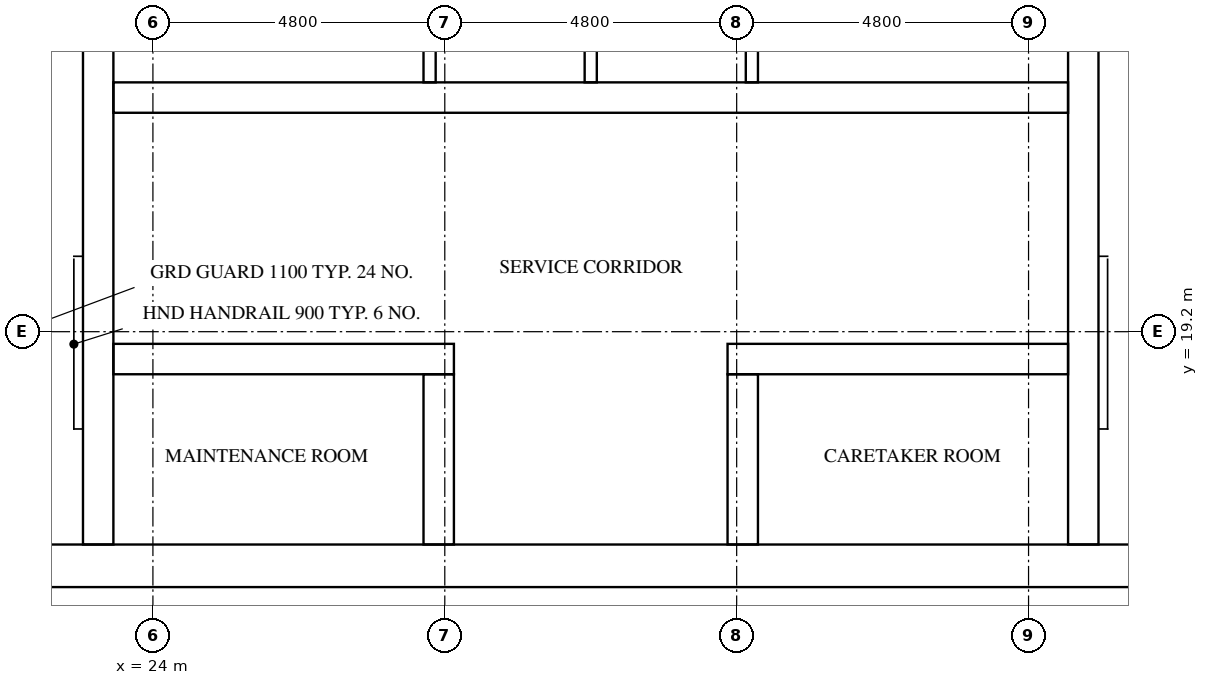
"""IFC4 building model, lengths in metres.
Left out: names, types, materials, properties, quantities, classifications, styles, units other than length and angle.
Written with IfcOpenShell. Run it as: python <this file> out.ifc"""

import sys

from ifc_helpers import new_model, si_unit, direction, frame, frame_2d, origin, place, context, subcontext, project, spatial, rectangle, extrude, element, fill, save


model = new_model("IFC4")
c1 = context("Model", 3, precision=1e-05, world=origin(), true_north=direction((0.0, 1.0)))
c2 = subcontext(c1, "Body", "Model", "MODEL_VIEW")
j1 = project(units=[si_unit("LENGTHUNIT", "METRE"), si_unit("PLANEANGLEUNIT", "RADIAN")], contexts=[c1])
p1 = place(None, origin())
s1 = spatial("IfcSite", under=j1, at=p1, CompositionType="ELEMENT")
p2 = place(p1, origin())
s2 = spatial("IfcBuilding", under=s1, at=p2, CompositionType="ELEMENT")
p3 = place(p2, frame((0.0, 0.0, 219.3)))
s3 = spatial("IfcBuildingStorey", under=s2, at=p3, CompositionType="ELEMENT", Elevation=219.3)
p4 = place(p3, frame((15.0, 15.35, 0.0), z_axis=(0.0, 0.0, 1.0), x_axis=(1.0, 0.0, 0.0)))
e1 = element("IfcWall", 1, at=p4, inside=s3, PredefinedType="SHEAR", context=c2, shape_type="SweptSolid", body=[
    extrude(rectangle(XDim=32.4, YDim=0.7, at=frame_2d((16.2, 0.0))), origin(), (0.0, 0.0, 1.0), 3.2),
])
p5 = place(p4, frame((15.3, 0.0, 0.0)))
e2 = element("IfcOpeningElement", 2, at=p5, cuts=e1, PredefinedType="OPENING", context=c2, shape_type="SweptSolid", body=[
    extrude(rectangle(XDim=1.8, YDim=2.1, at=frame_2d((0.9, 1.05))), frame((0.0, 0.36, 0.0), z_axis=(0.0, -1.0, 0.0), x_axis=(1.0, 0.0, 0.0)), (0.0, 0.0, 1.0), 0.72),
])
p6 = place(p3, frame((23.1, 15.7, 0.0), z_axis=(0.0, 0.0, 1.0), x_axis=(0.0, 1.0, 0.0)))
e3 = element("IfcWall", 3, at=p6, inside=s3, PredefinedType="SHEAR", context=c2, shape_type="SweptSolid", body=[
    extrude(rectangle(XDim=21.4, YDim=0.5, at=frame_2d((10.7, 0.0))), origin(), (0.0, 0.0, 1.0), 3.2),
])
p7 = place(p3, frame((39.3, 15.7, 0.0), z_axis=(0.0, 0.0, 1.0), x_axis=(0.0, 1.0, 0.0)))
e4 = element("IfcWall", 4, at=p7, inside=s3, PredefinedType="SHEAR", context=c2, shape_type="SweptSolid", body=[
    extrude(rectangle(XDim=8.55, YDim=0.5, at=frame_2d((4.275, 0.0))), origin(), (0.0, 0.0, 1.0), 3.2),
])
p8 = place(p3, frame((23.35, 18.75, 0.0), z_axis=(0.0, 0.0, 1.0), x_axis=(1.0, 0.0, 0.0)))
e5 = element("IfcWall", 5, at=p8, inside=s3, PredefinedType="SHEAR", context=c2, shape_type="SweptSolid", body=[
    extrude(rectangle(XDim=5.6, YDim=0.5, at=frame_2d((2.8, 0.0))), origin(), (0.0, 0.0, 1.0), 3.2),
])
p9 = place(p8, frame((2.05, 0.0, 0.0)))
e6 = element("IfcOpeningElement", 6, at=p9, cuts=e5, PredefinedType="OPENING", context=c2, shape_type="SweptSolid", body=[
    extrude(rectangle(XDim=1.0, YDim=2.1, at=frame_2d((0.5, 1.05))), frame((0.0, 0.26, 0.0), z_axis=(0.0, -1.0, 0.0), x_axis=(1.0, 0.0, 0.0)), (0.0, 0.0, 1.0), 0.52),
])
p10 = place(p3, frame((33.45, 18.75, 0.0), z_axis=(0.0, 0.0, 1.0), x_axis=(1.0, 0.0, 0.0)))
e7 = element("IfcWall", 7, at=p10, inside=s3, PredefinedType="SHEAR", context=c2, shape_type="SweptSolid", body=[
    extrude(rectangle(XDim=5.6, YDim=0.5, at=frame_2d((2.8, 0.0))), origin(), (0.0, 0.0, 1.0), 3.2),
])
p11 = place(p10, frame((2.55, 0.0, 0.0)))
e8 = element("IfcOpeningElement", 8, at=p11, cuts=e7, PredefinedType="OPENING", context=c2, shape_type="SweptSolid", body=[
    extrude(rectangle(XDim=1.0, YDim=2.1, at=frame_2d((0.5, 1.05))), frame((0.0, 0.26, 0.0), z_axis=(0.0, -1.0, 0.0), x_axis=(1.0, 0.0, 0.0)), (0.0, 0.0, 1.0), 0.52),
])
p12 = place(p3, frame((23.35, 23.05, 0.0), z_axis=(0.0, 0.0, 1.0), x_axis=(1.0, 0.0, 0.0)))
e9 = element("IfcWall", 9, at=p12, inside=s3, PredefinedType="SHEAR", context=c2, shape_type="SweptSolid", body=[
    extrude(rectangle(XDim=15.7, YDim=0.5, at=frame_2d((7.85, 0.0))), origin(), (0.0, 0.0, 1.0), 3.2),
])
p13 = place(p12, frame((2.05, 0.0, 0.0)))
e10 = element("IfcOpeningElement", 10, at=p13, cuts=e9, PredefinedType="OPENING", context=c2, shape_type="SweptSolid", body=[
    extrude(rectangle(XDim=1.0, YDim=2.1, at=frame_2d((0.5, 1.05))), frame((0.0, 0.26, 0.0), z_axis=(0.0, -1.0, 0.0), x_axis=(1.0, 0.0, 0.0)), (0.0, 0.0, 1.0), 0.52),
])
p14 = place(p12, frame((12.65, 0.0, 0.0)))
e11 = element("IfcOpeningElement", 11, at=p14, cuts=e9, PredefinedType="OPENING", context=c2, shape_type="SweptSolid", body=[
    extrude(rectangle(XDim=1.0, YDim=2.1, at=frame_2d((0.5, 1.05))), frame((0.0, 0.26, 0.0), z_axis=(0.0, -1.0, 0.0), x_axis=(1.0, 0.0, 0.0)), (0.0, 0.0, 1.0), 0.52),
])
for number, where, z_axis, x_axis in (
    (12, (28.7, 15.7, 0.0), (0.0, 0.0, 1.0), (0.0, 1.0, 0.0)),
    (13, (33.7, 15.7, 0.0), (0.0, 0.0, 1.0), (0.0, 1.0, 0.0)),
):
    element("IfcWall", number, at=place(p3, frame(where, z_axis=z_axis, x_axis=x_axis)), inside=s3, PredefinedType="SHEAR", context=c2, shape_type="SweptSolid", body=[
        extrude(rectangle(XDim=2.8, YDim=0.5, at=frame_2d((1.4, 0.0))), origin(), (0.0, 0.0, 1.0), 3.2),
    ])
for number, where, z_axis, x_axis in (
    (14, (28.55, 23.3, 0.0), (0.0, 0.0, 1.0), (0.0, 1.0, 0.0)),
    (15, (31.2, 23.3, 0.0), (0.0, 0.0, 1.0), (0.0, 1.0, 0.0)),
    (16, (33.85, 23.3, 0.0), (0.0, 0.0, 1.0), (0.0, 1.0, 0.0)),
):
    element("IfcWall", number, at=place(p3, frame(where, z_axis=z_axis, x_axis=x_axis)), inside=s3, PredefinedType="SOLIDWALL", context=c2, shape_type="SweptSolid", body=[
        extrude(rectangle(XDim=2.6, YDim=0.2, at=frame_2d((1.3, 0.0))), origin(), (0.0, 0.0, 1.0), 3.2),
    ])
p15 = place(p5, frame((1.8, 0.0, 0.0), z_axis=(0.0, 0.0, 1.0), x_axis=(-1.0, 0.0, 0.0)))
e17 = element("IfcDoor", 17, at=p15, inside=s3, OperationType="DOUBLE_DOOR_SINGLE_SWING", PredefinedType="DOOR", context=c2, shape_type="SweptSolid", body=[
    extrude(rectangle(XDim=1.8, YDim=2.1, at=frame_2d((0.9, 1.05))), frame((0.0, 0.025, 0.0), z_axis=(0.0, -1.0, 0.0), x_axis=(1.0, 0.0, 0.0)), (0.0, 0.0, 1.0), 0.05),
])
fill(e2, e17)
p16 = place(p13, frame((1.0, 0.0, 0.0), z_axis=(0.0, 0.0, 1.0), x_axis=(-1.0, 0.0, 0.0)))
e18 = element("IfcDoor", 18, at=p16, inside=s3, OperationType="SINGLE_SWING_RIGHT", PredefinedType="DOOR", context=c2, shape_type="SweptSolid", body=[
    extrude(rectangle(XDim=1.0, YDim=2.1, at=frame_2d((0.5, 1.05))), frame((0.0, 0.025, 0.0), z_axis=(0.0, -1.0, 0.0), x_axis=(1.0, 0.0, 0.0)), (0.0, 0.0, 1.0), 0.05),
])
fill(e10, e18)
p17 = place(p14, frame((1.0, 0.0, 0.0), z_axis=(0.0, 0.0, 1.0), x_axis=(-1.0, 0.0, 0.0)))
e19 = element("IfcDoor", 19, at=p17, inside=s3, OperationType="SINGLE_SWING_LEFT", PredefinedType="DOOR", context=c2, shape_type="SweptSolid", body=[
    extrude(rectangle(XDim=1.0, YDim=2.1, at=frame_2d((0.5, 1.05))), frame((0.0, 0.025, 0.0), z_axis=(0.0, -1.0, 0.0), x_axis=(1.0, 0.0, 0.0)), (0.0, 0.0, 1.0), 0.05),
])
fill(e11, e19)
p18 = place(p9, origin())
e20 = element("IfcDoor", 20, at=p18, inside=s3, OperationType="SINGLE_SWING_RIGHT", PredefinedType="DOOR", context=c2, shape_type="SweptSolid", body=[
    extrude(rectangle(XDim=1.0, YDim=2.1, at=frame_2d((0.5, 1.05))), frame((0.0, 0.025, 0.0), z_axis=(0.0, -1.0, 0.0), x_axis=(1.0, 0.0, 0.0)), (0.0, 0.0, 1.0), 0.05),
])
fill(e6, e20)
p19 = place(p11, origin())
e21 = element("IfcDoor", 21, at=p19, inside=s3, OperationType="SINGLE_SWING_LEFT", PredefinedType="DOOR", context=c2, shape_type="SweptSolid", body=[
    extrude(rectangle(XDim=1.0, YDim=2.1, at=frame_2d((0.5, 1.05))), frame((0.0, 0.025, 0.0), z_axis=(0.0, -1.0, 0.0), x_axis=(1.0, 0.0, 0.0)), (0.0, 0.0, 1.0), 0.05),
])
fill(e8, e21)
save(model, sys.argv[1])
